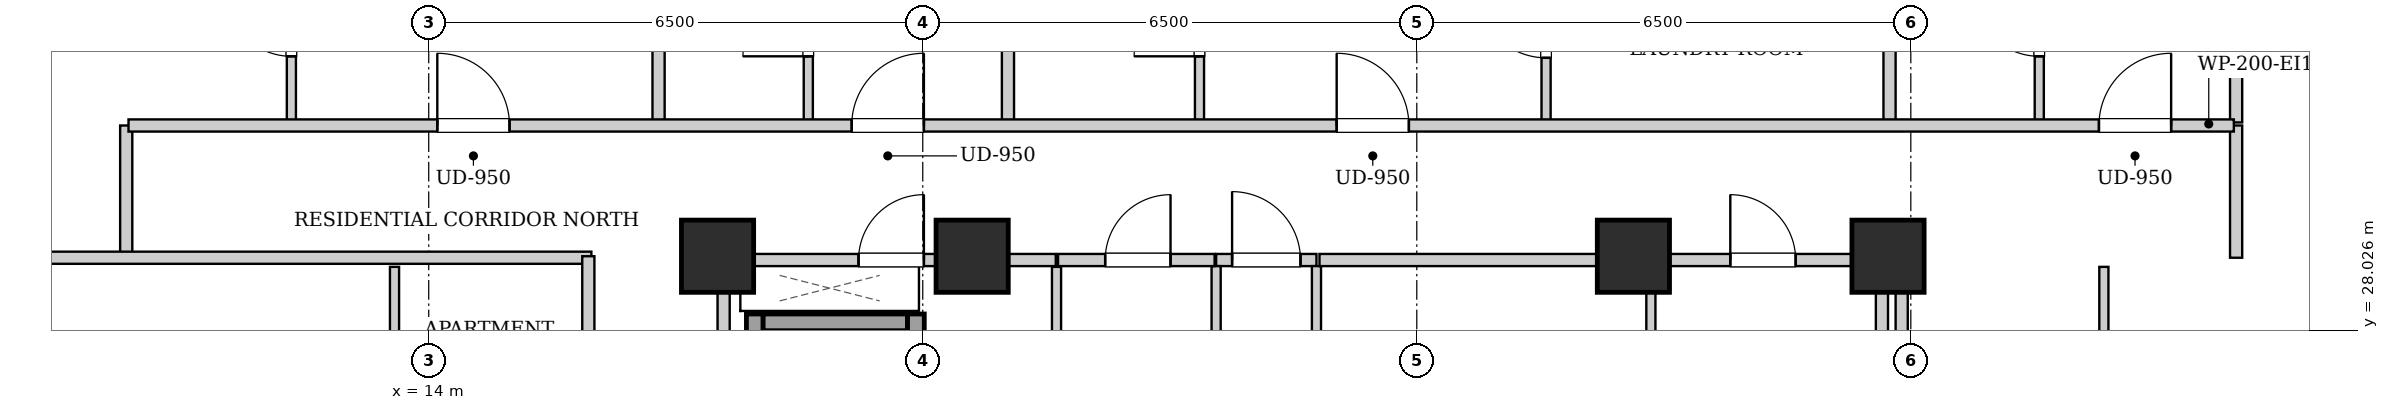
"""IFC4 building model, lengths in metres.
Left out: names, types, materials, properties, quantities, classifications, styles, units other than length and angle.
Written with IfcOpenShell. Run it as: python <this file> out.ifc"""

import sys

from ifc_helpers import new_model, si_unit, direction, frame, frame_2d, origin, origin_2d, place, context, subcontext, project, spatial, rectangle, extrude, element, fill, save


model = new_model("IFC4")
c1 = context("Model", 3, precision=1e-05, world=origin(), true_north=direction((0.0, 1.0)))
c2 = subcontext(c1, "Body", "Model", "MODEL_VIEW")
j1 = project(units=[si_unit("LENGTHUNIT", "METRE"), si_unit("PLANEANGLEUNIT", "RADIAN")], contexts=[c1])
p1 = place(None, origin())
s1 = spatial("IfcSite", under=j1, at=p1, CompositionType="ELEMENT")
p2 = place(p1, origin())
s2 = spatial("IfcBuilding", under=s1, at=p2, CompositionType="ELEMENT")
p3 = place(p2, frame((0.0, 0.0, 143.9)))
s3 = spatial("IfcBuildingStorey", under=s2, at=p3, CompositionType="ELEMENT", Elevation=143.9)
for number, where, z_axis, x_axis in (
    (1, (17.8, 29.0, 0.0), (0.0, 0.0, 1.0), (1.0, 0.0, 0.0)),
    (2, (21.15, 29.0, 0.0), (0.0, 0.0, 1.0), (1.0, 0.0, 0.0)),
    (3, (29.85, 29.0, 0.0), (0.0, 0.0, 1.0), (1.0, 0.0, 0.0)),
    (4, (33.2, 29.0, 0.0), (0.0, 0.0, 1.0), (1.0, 0.0, 0.0)),
):
    element("IfcColumn", number, at=place(p3, frame(where, z_axis=z_axis, x_axis=x_axis)), inside=s3, PredefinedType="COLUMN", context=c2, shape_type="SweptSolid", body=[
        extrude(rectangle(XDim=0.95, YDim=0.95, at=origin_2d()), origin(), (0.0, 0.0, 1.0), 3.25),
    ])
p4 = place(p3, frame((18.29, 24.1, 0.0), z_axis=(0.0, 0.0, 1.0), x_axis=(0.0, 1.0, 0.0)))
e5 = element("IfcWall", 5, at=p4, inside=s3, PredefinedType="SHEAR", context=c2, shape_type="SweptSolid", body=[
    extrude(rectangle(XDim=4.14, YDim=0.22, at=frame_2d((2.07, 0.0))), origin(), (0.0, 0.0, 1.0), 2.99),
])
p5 = place(p3, frame((18.4, 28.13, 0.0), z_axis=(0.0, 0.0, 1.0), x_axis=(1.0, 0.0, 0.0)))
e6 = element("IfcWall", 6, at=p5, inside=s3, PredefinedType="SHEAR", context=c2, shape_type="SweptSolid", body=[
    extrude(rectangle(XDim=1.9, YDim=0.22, at=frame_2d((0.95, 0.0))), origin(), (0.0, 0.0, 1.0), 2.99),
])
p6 = place(p3, frame((20.41, 26.06, 0.0), z_axis=(0.0, 0.0, 1.0), x_axis=(0.0, 1.0, 0.0)))
e7 = element("IfcWall", 7, at=p6, inside=s3, PredefinedType="SHEAR", context=c2, shape_type="SweptSolid", body=[
    extrude(rectangle(XDim=2.18, YDim=0.22, at=frame_2d((1.09, 0.0))), origin(), (0.0, 0.0, 1.0), 2.99),
])
for number, where, z_axis, x_axis in (
    (8, (17.88, 24.12, 0.0), (0.0, 0.0, 1.0), (0.0, 1.0, 0.0)),
    (9, (33.12, 24.12, 0.0), (0.0, 0.0, 1.0), (0.0, 1.0, 0.0)),
):
    element("IfcWall", number, at=place(p3, frame(where, z_axis=z_axis, x_axis=x_axis)), inside=s3, PredefinedType="PARTITIONING", context=c2, shape_type="SweptSolid", body=[
        extrude(rectangle(XDim=4.76, YDim=0.16, at=frame_2d((2.38, 0.0))), origin(), (0.0, 0.0, 1.0), 2.99),
    ])
p7 = place(p3, frame((24.36, 28.95, 0.0), z_axis=(0.0, 0.0, 1.0), x_axis=(1.0, 0.0, 0.0)))
e10 = element("IfcWall", 10, at=p7, inside=s3, PredefinedType="PARTITIONING", context=c2, shape_type="SweptSolid", body=[
    extrude(rectangle(XDim=1.32, YDim=0.16, at=frame_2d((0.66, 0.0))), origin(), (0.0, 0.0, 1.0), 2.426),
])
p8 = place(p7, frame((0.21, 0.0, 0.0)))
e11 = element("IfcOpeningElement", 11, at=p8, cuts=e10, PredefinedType="OPENING", context=c2, shape_type="SweptSolid", body=[
    extrude(rectangle(XDim=0.9, YDim=2.05, at=frame_2d((0.45, 1.025))), frame((0.0, 0.09, 0.0), z_axis=(0.0, -1.0, 0.0), x_axis=(1.0, 0.0, 0.0)), (0.0, 0.0, 1.0), 0.18),
])
p9 = place(p3, frame((17.96, 28.95, 0.0), z_axis=(0.0, 0.0, 1.0), x_axis=(1.0, 0.0, 0.0)))
e12 = element("IfcWall", 12, at=p9, inside=s3, PredefinedType="PARTITIONING", context=c2, shape_type="SweptSolid", body=[
    extrude(rectangle(XDim=4.29, YDim=0.16, at=frame_2d((2.145, 0.0))), origin(), (0.0, 0.0, 1.0), 2.426),
])
p10 = place(p9, frame((1.695, 0.0, 0.0)))
e13 = element("IfcOpeningElement", 13, at=p10, cuts=e12, PredefinedType="OPENING", context=c2, shape_type="SweptSolid", body=[
    extrude(rectangle(XDim=0.86, YDim=2.05, at=frame_2d((0.43, 1.025))), frame((0.0, 0.09, 0.0), z_axis=(0.0, -1.0, 0.0), x_axis=(1.0, 0.0, 0.0)), (0.0, 0.0, 1.0), 0.18),
])
for number, where, z_axis, x_axis in (
    (14, (24.36, 25.0, 0.0), (0.0, 0.0, 1.0), (0.0, 1.0, 0.0)),
    (15, (25.68, 25.0, 0.0), (0.0, 0.0, 1.0), (0.0, 1.0, 0.0)),
):
    element("IfcWall", number, at=place(p3, frame(where, z_axis=z_axis, x_axis=x_axis)), inside=s3, PredefinedType="PARTITIONING", context=c2, shape_type="SweptSolid", body=[
        extrude(rectangle(XDim=3.87, YDim=0.12, at=frame_2d((1.935, 0.0))), origin(), (0.0, 0.0, 1.0), 2.99),
    ])
p11 = place(p3, frame((30.08, 26.18, 0.0), z_axis=(0.0, 0.0, 1.0), x_axis=(0.0, 1.0, 0.0)))
e16 = element("IfcWall", 16, at=p11, inside=s3, PredefinedType="PARTITIONING", context=c2, shape_type="SweptSolid", body=[
    extrude(rectangle(XDim=2.68, YDim=0.12, at=frame_2d((1.34, 0.0))), origin(), (0.0, 0.0, 1.0), 2.99),
])
p12 = place(p3, frame((30.08, 28.95, 0.0), z_axis=(0.0, 0.0, 1.0), x_axis=(1.0, 0.0, 0.0)))
e17 = element("IfcWall", 17, at=p12, inside=s3, PredefinedType="PARTITIONING", context=c2, shape_type="SweptSolid", body=[
    extrude(rectangle(XDim=2.96, YDim=0.16, at=frame_2d((1.48, 0.0))), origin(), (0.0, 0.0, 1.0), 2.99),
])
p13 = place(p12, frame((1.045, 0.0, 0.0)))
e18 = element("IfcOpeningElement", 18, at=p13, cuts=e17, PredefinedType="OPENING", context=c2, shape_type="SweptSolid", body=[
    extrude(rectangle(XDim=0.86, YDim=2.05, at=frame_2d((0.43, 1.025))), frame((0.0, 0.09, 0.0), z_axis=(0.0, -1.0, 0.0), x_axis=(1.0, 0.0, 0.0)), (0.0, 0.0, 1.0), 0.18),
])
p14 = place(p3, frame((22.26, 25.0, 0.0), z_axis=(0.0, 0.0, 1.0), x_axis=(0.0, 1.0, 0.0)))
e19 = element("IfcWall", 19, at=p14, inside=s3, PredefinedType="PARTITIONING", context=c2, shape_type="SweptSolid", body=[
    extrude(rectangle(XDim=3.86, YDim=0.12, at=frame_2d((1.93, 0.0))), origin(), (0.0, 0.0, 1.0), 2.99),
])
p15 = place(p3, frame((22.28, 28.95, 0.0), z_axis=(0.0, 0.0, 1.0), x_axis=(1.0, 0.0, 0.0)))
e20 = element("IfcWall", 20, at=p15, inside=s3, PredefinedType="PARTITIONING", context=c2, shape_type="SweptSolid", body=[
    extrude(rectangle(XDim=2.06, YDim=0.16, at=frame_2d((1.03, 0.0))), origin(), (0.0, 0.0, 1.0), 2.426),
])
p16 = place(p15, frame((0.62, 0.0, 0.0)))
e21 = element("IfcOpeningElement", 21, at=p16, cuts=e20, PredefinedType="OPENING", context=c2, shape_type="SweptSolid", body=[
    extrude(rectangle(XDim=0.86, YDim=2.05, at=frame_2d((0.43, 1.025))), frame((0.0, 0.09, 0.0), z_axis=(0.0, -1.0, 0.0), x_axis=(1.0, 0.0, 0.0)), (0.0, 0.0, 1.0), 0.18),
])
p17 = place(p3, frame((25.72, 28.95, 0.0), z_axis=(0.0, 0.0, 1.0), x_axis=(1.0, 0.0, 0.0)))
e22 = element("IfcWall", 22, at=p17, inside=s3, PredefinedType="PARTITIONING", context=c2, shape_type="SweptSolid", body=[
    extrude(rectangle(XDim=4.32, YDim=0.16, at=frame_2d((2.16, 0.0))), origin(), (0.0, 0.0, 1.0), 2.426),
])
for number, where, z_axis, x_axis in (
    (23, (10.02, 28.98, 0.0), (0.0, 0.0, 1.0), (0.0, 1.0, 0.0)),
    (24, (37.78, 28.98, 0.0), (0.0, 0.0, 1.0), (0.0, 1.0, 0.0)),
):
    element("IfcWall", number, at=place(p3, frame(where, z_axis=z_axis, x_axis=x_axis)), inside=s3, PredefinedType="PARTITIONING", context=c2, shape_type="SweptSolid", body=[
        extrude(rectangle(XDim=1.74, YDim=0.16, at=frame_2d((0.87, 0.0))), origin(), (0.0, 0.0, 1.0), 2.99),
    ])
p18 = place(p3, frame((7.78, 28.98, 0.0), z_axis=(0.0, 0.0, 1.0), x_axis=(1.0, 0.0, 0.0)))
e25 = element("IfcWall", 25, at=p18, inside=s3, PredefinedType="PARTITIONING", context=c2, shape_type="SweptSolid", body=[
    extrude(rectangle(XDim=8.36, YDim=0.16, at=frame_2d((4.18, 0.0))), origin(), (0.0, 0.0, 1.0), 2.426),
])
p19 = place(p3, frame((12.193, 30.76, 0.0), z_axis=(0.0, 0.0, 1.0), x_axis=(0.0, 1.0, 0.0)))
e26 = element("IfcWall", 26, at=p19, inside=s3, PredefinedType="PARTITIONING", context=c2, shape_type="SweptSolid", body=[
    extrude(rectangle(XDim=2.6, YDim=0.12, at=frame_2d((1.3, 0.0))), origin(), (0.0, 0.0, 1.0), 2.99),
])
p20 = place(p19, frame((0.87, 0.0, 0.0)))
e27 = element("IfcOpeningElement", 27, at=p20, cuts=e26, PredefinedType="OPENING", context=c2, shape_type="SweptSolid", body=[
    extrude(rectangle(XDim=0.86, YDim=2.05, at=frame_2d((0.43, 1.025))), frame((0.0, 0.07, 0.0), z_axis=(0.0, -1.0, 0.0), x_axis=(1.0, 0.0, 0.0)), (0.0, 0.0, 1.0), 0.14),
])
p21 = place(p3, frame((17.024, 30.76, 0.0), z_axis=(0.0, 0.0, 1.0), x_axis=(0.0, 1.0, 0.0)))
e28 = element("IfcWall", 28, at=p21, inside=s3, PredefinedType="PARTITIONING", context=c2, shape_type="SweptSolid", body=[
    extrude(rectangle(XDim=12.26, YDim=0.16, at=frame_2d((6.13, 0.0))), origin(), (0.0, 0.0, 1.0), 2.99),
])
p22 = place(p3, frame((18.994, 30.76, 0.0), z_axis=(0.0, 0.0, 1.0), x_axis=(0.0, 1.0, 0.0)))
e29 = element("IfcWall", 29, at=p22, inside=s3, PredefinedType="PARTITIONING", context=c2, shape_type="SweptSolid", body=[
    extrude(rectangle(XDim=2.6, YDim=0.12, at=frame_2d((1.3, 0.0))), origin(), (0.0, 0.0, 1.0), 2.99),
])
p23 = place(p22, frame((0.87, 0.0, 0.0)))
e30 = element("IfcOpeningElement", 30, at=p23, cuts=e29, PredefinedType="OPENING", context=c2, shape_type="SweptSolid", body=[
    extrude(rectangle(XDim=0.86, YDim=2.05, at=frame_2d((0.43, 1.025))), frame((0.0, 0.07, 0.0), z_axis=(0.0, -1.0, 0.0), x_axis=(1.0, 0.0, 0.0)), (0.0, 0.0, 1.0), 0.14),
])
p24 = place(p3, frame((21.621, 30.76, 0.0), z_axis=(0.0, 0.0, 1.0), x_axis=(0.0, 1.0, 0.0)))
e31 = element("IfcWall", 31, at=p24, inside=s3, PredefinedType="PARTITIONING", context=c2, shape_type="SweptSolid", body=[
    extrude(rectangle(XDim=12.26, YDim=0.16, at=frame_2d((6.13, 0.0))), origin(), (0.0, 0.0, 1.0), 2.99),
])
p25 = place(p3, frame((24.141, 30.76, 0.0), z_axis=(0.0, 0.0, 1.0), x_axis=(0.0, 1.0, 0.0)))
e32 = element("IfcWall", 32, at=p25, inside=s3, PredefinedType="PARTITIONING", context=c2, shape_type="SweptSolid", body=[
    extrude(rectangle(XDim=2.6, YDim=0.12, at=frame_2d((1.3, 0.0))), origin(), (0.0, 0.0, 1.0), 2.99),
])
p26 = place(p25, frame((0.87, 0.0, 0.0)))
e33 = element("IfcOpeningElement", 33, at=p26, cuts=e32, PredefinedType="OPENING", context=c2, shape_type="SweptSolid", body=[
    extrude(rectangle(XDim=0.86, YDim=2.05, at=frame_2d((0.43, 1.025))), frame((0.0, 0.07, 0.0), z_axis=(0.0, -1.0, 0.0), x_axis=(1.0, 0.0, 0.0)), (0.0, 0.0, 1.0), 0.14),
])
p27 = place(p3, frame((28.701, 30.76, 0.0), z_axis=(0.0, 0.0, 1.0), x_axis=(0.0, 1.0, 0.0)))
e34 = element("IfcWall", 34, at=p27, inside=s3, PredefinedType="PARTITIONING", context=c2, shape_type="SweptSolid", body=[
    extrude(rectangle(XDim=2.6, YDim=0.12, at=frame_2d((1.3, 0.0))), origin(), (0.0, 0.0, 1.0), 2.99),
])
p28 = place(p27, frame((0.85, 0.0, 0.0)))
e35 = element("IfcOpeningElement", 35, at=p28, cuts=e34, PredefinedType="OPENING", context=c2, shape_type="SweptSolid", body=[
    extrude(rectangle(XDim=0.9, YDim=2.05, at=frame_2d((0.45, 1.025))), frame((0.0, 0.07, 0.0), z_axis=(0.0, -1.0, 0.0), x_axis=(1.0, 0.0, 0.0)), (0.0, 0.0, 1.0), 0.14),
])
p29 = place(p3, frame((37.78, 30.76, 0.0), z_axis=(0.0, 0.0, 1.0), x_axis=(0.0, 1.0, 0.0)))
e36 = element("IfcWall", 36, at=p29, inside=s3, PredefinedType="PARTITIONING", context=c2, shape_type="SweptSolid", body=[
    extrude(rectangle(XDim=2.66, YDim=0.16, at=frame_2d((1.33, 0.0))), origin(), (0.0, 0.0, 1.0), 2.99),
])
p30 = place(p3, frame((33.22, 30.76, 0.0), z_axis=(0.0, 0.0, 1.0), x_axis=(0.0, 1.0, 0.0)))
e37 = element("IfcWall", 37, at=p30, inside=s3, PredefinedType="PARTITIONING", context=c2, shape_type="SweptSolid", body=[
    extrude(rectangle(XDim=10.28, YDim=0.16, at=frame_2d((5.14, 0.0))), origin(), (0.0, 0.0, 1.0), 2.426),
])
p31 = place(p3, frame((35.19, 30.76, 0.0), z_axis=(0.0, 0.0, 1.0), x_axis=(0.0, 1.0, 0.0)))
e38 = element("IfcWall", 38, at=p31, inside=s3, PredefinedType="PARTITIONING", context=c2, shape_type="SweptSolid", body=[
    extrude(rectangle(XDim=2.6, YDim=0.12, at=frame_2d((1.3, 0.0))), origin(), (0.0, 0.0, 1.0), 2.99),
])
p32 = place(p31, frame((0.87, 0.0, 0.0)))
e39 = element("IfcOpeningElement", 39, at=p32, cuts=e38, PredefinedType="OPENING", context=c2, shape_type="SweptSolid", body=[
    extrude(rectangle(XDim=0.86, YDim=2.05, at=frame_2d((0.43, 1.025))), frame((0.0, 0.07, 0.0), z_axis=(0.0, -1.0, 0.0), x_axis=(1.0, 0.0, 0.0)), (0.0, 0.0, 1.0), 0.14),
])
p33 = place(p3, frame((13.55, 23.527, 0.0), z_axis=(0.0, 0.0, 1.0), x_axis=(0.0, 1.0, 0.0)))
e40 = element("IfcWall", 40, at=p33, inside=s3, PredefinedType="PARTITIONING", context=c2, shape_type="SweptSolid", body=[
    extrude(rectangle(XDim=5.333, YDim=0.12, at=frame_2d((2.667, 0.0))), origin(), (0.0, 0.0, 1.0), 2.99),
])
p34 = place(p33, frame((2.216, 0.0, 0.0)))
e41 = element("IfcOpeningElement", 41, at=p34, cuts=e40, PredefinedType="OPENING", context=c2, shape_type="SweptSolid", body=[
    extrude(rectangle(XDim=0.9, YDim=2.05, at=frame_2d((0.45, 1.025))), frame((0.0, 0.07, 0.0), z_axis=(0.0, -1.0, 0.0), x_axis=(1.0, 0.0, 0.0)), (0.0, 0.0, 1.0), 0.14),
])
p35 = place(p3, frame((36.04, 24.552, 0.0), z_axis=(0.0, 0.0, 1.0), x_axis=(0.0, 1.0, 0.0)))
e42 = element("IfcWall", 42, at=p35, inside=s3, PredefinedType="PARTITIONING", context=c2, shape_type="SweptSolid", body=[
    extrude(rectangle(XDim=4.308, YDim=0.12, at=frame_2d((2.154, 0.0))), origin(), (0.0, 0.0, 1.0), 2.99),
])
p36 = place(p35, frame((1.704, 0.0, 0.0)))
e43 = element("IfcOpeningElement", 43, at=p36, cuts=e42, PredefinedType="OPENING", context=c2, shape_type="SweptSolid", body=[
    extrude(rectangle(XDim=0.9, YDim=2.05, at=frame_2d((0.45, 1.025))), frame((0.0, 0.07, 0.0), z_axis=(0.0, -1.0, 0.0), x_axis=(1.0, 0.0, 0.0)), (0.0, 0.0, 1.0), 0.14),
])
p37 = place(p3, frame((10.05, 30.72, 0.0), z_axis=(0.0, 0.0, 1.0), x_axis=(1.0, 0.0, 0.0)))
e44 = element("IfcWall", 44, at=p37, inside=s3, PredefinedType="PARTITIONING", context=c2, shape_type="SweptSolid", body=[
    extrude(rectangle(XDim=27.7, YDim=0.16, at=frame_2d((13.85, 0.0))), origin(), (0.0, 0.0, 1.0), 2.99),
])
p38 = place(p37, frame((4.063, 0.0, 0.0)))
e45 = element("IfcOpeningElement", 45, at=p38, cuts=e44, PredefinedType="OPENING", context=c2, shape_type="SweptSolid", body=[
    extrude(rectangle(XDim=0.95, YDim=2.1, at=frame_2d((0.475, 1.05))), frame((0.0, 0.09, 0.0), z_axis=(0.0, -1.0, 0.0), x_axis=(1.0, 0.0, 0.0)), (0.0, 0.0, 1.0), 0.18),
])
p39 = place(p37, frame((9.515, 0.0, 0.0)))
e46 = element("IfcOpeningElement", 46, at=p39, cuts=e44, PredefinedType="OPENING", context=c2, shape_type="SweptSolid", body=[
    extrude(rectangle(XDim=0.95, YDim=2.1, at=frame_2d((0.475, 1.05))), frame((0.0, 0.09, 0.0), z_axis=(0.0, -1.0, 0.0), x_axis=(1.0, 0.0, 0.0)), (0.0, 0.0, 1.0), 0.18),
])
p40 = place(p37, frame((15.896, 0.0, 0.0)))
e47 = element("IfcOpeningElement", 47, at=p40, cuts=e44, PredefinedType="OPENING", context=c2, shape_type="SweptSolid", body=[
    extrude(rectangle(XDim=0.95, YDim=2.1, at=frame_2d((0.475, 1.05))), frame((0.0, 0.09, 0.0), z_axis=(0.0, -1.0, 0.0), x_axis=(1.0, 0.0, 0.0)), (0.0, 0.0, 1.0), 0.18),
])
p41 = place(p37, frame((25.925, 0.0, 0.0)))
e48 = element("IfcOpeningElement", 48, at=p41, cuts=e44, PredefinedType="OPENING", context=c2, shape_type="SweptSolid", body=[
    extrude(rectangle(XDim=0.95, YDim=2.1, at=frame_2d((0.475, 1.05))), frame((0.0, 0.09, 0.0), z_axis=(0.0, -1.0, 0.0), x_axis=(1.0, 0.0, 0.0)), (0.0, 0.0, 1.0), 0.18),
])
p42 = place(p3, frame((16.1, 15.07, 0.0), z_axis=(0.0, 0.0, 1.0), x_axis=(0.0, 1.0, 0.0)))
e49 = element("IfcWall", 49, at=p42, inside=s3, PredefinedType="PARTITIONING", context=c2, shape_type="SweptSolid", body=[
    extrude(rectangle(XDim=13.93, YDim=0.16, at=frame_2d((6.965, 0.0))), origin(), (0.0, 0.0, 1.0), 2.99),
])
p43 = place(p42, frame((3.608, 0.0, 0.0)))
e50 = element("IfcOpeningElement", 50, at=p43, cuts=e49, PredefinedType="OPENING", context=c2, shape_type="SweptSolid", body=[
    extrude(rectangle(XDim=0.95, YDim=2.1, at=frame_2d((0.475, 1.05))), frame((0.0, 0.09, 0.0), z_axis=(0.0, -1.0, 0.0), x_axis=(1.0, 0.0, 0.0)), (0.0, 0.0, 1.0), 0.18),
])
p44 = place(p42, frame((10.649, 0.0, 0.0)))
e51 = element("IfcOpeningElement", 51, at=p44, cuts=e49, PredefinedType="OPENING", context=c2, shape_type="SweptSolid", body=[
    extrude(rectangle(XDim=0.95, YDim=2.1, at=frame_2d((0.475, 1.05))), frame((0.0, 0.09, 0.0), z_axis=(0.0, -1.0, 0.0), x_axis=(1.0, 0.0, 0.0)), (0.0, 0.0, 1.0), 0.18),
])
p45 = place(p3, frame((33.38, 15.02, 0.0), z_axis=(0.0, 0.0, 1.0), x_axis=(0.0, 1.0, 0.0)))
e52 = element("IfcWall", 52, at=p45, inside=s3, PredefinedType="PARTITIONING", context=c2, shape_type="SweptSolid", body=[
    extrude(rectangle(XDim=13.98, YDim=0.16, at=frame_2d((6.99, 0.0))), origin(), (0.0, 0.0, 1.0), 2.99),
])
p46 = place(p8, origin())
e53 = element("IfcDoor", 53, at=p46, inside=s3, OperationType="SINGLE_SWING_LEFT", PredefinedType="DOOR", context=c2, shape_type="SweptSolid", body=[
    extrude(rectangle(XDim=0.9, YDim=2.05, at=frame_2d((0.45, 1.025))), frame((0.0, 0.025, 0.0), z_axis=(0.0, -1.0, 0.0), x_axis=(1.0, 0.0, 0.0)), (0.0, 0.0, 1.0), 0.05),
])
fill(e11, e53)
p47 = place(p10, origin())
e54 = element("IfcDoor", 54, at=p47, inside=s3, OperationType="SINGLE_SWING_RIGHT", PredefinedType="DOOR", context=c2, shape_type="SweptSolid", body=[
    extrude(rectangle(XDim=0.86, YDim=2.05, at=frame_2d((0.43, 1.025))), frame((0.0, 0.025, 0.0), z_axis=(0.0, -1.0, 0.0), x_axis=(1.0, 0.0, 0.0)), (0.0, 0.0, 1.0), 0.05),
])
fill(e13, e54)
p48 = place(p13, origin())
e55 = element("IfcDoor", 55, at=p48, inside=s3, OperationType="SINGLE_SWING_LEFT", PredefinedType="DOOR", context=c2, shape_type="SweptSolid", body=[
    extrude(rectangle(XDim=0.86, YDim=2.05, at=frame_2d((0.43, 1.025))), frame((0.0, 0.025, 0.0), z_axis=(0.0, -1.0, 0.0), x_axis=(1.0, 0.0, 0.0)), (0.0, 0.0, 1.0), 0.05),
])
fill(e18, e55)
p49 = place(p16, origin())
e56 = element("IfcDoor", 56, at=p49, inside=s3, OperationType="SINGLE_SWING_RIGHT", PredefinedType="DOOR", context=c2, shape_type="SweptSolid", body=[
    extrude(rectangle(XDim=0.86, YDim=2.05, at=frame_2d((0.43, 1.025))), frame((0.0, 0.025, 0.0), z_axis=(0.0, -1.0, 0.0), x_axis=(1.0, 0.0, 0.0)), (0.0, 0.0, 1.0), 0.05),
])
fill(e21, e56)
p50 = place(p20, origin())
e57 = element("IfcDoor", 57, at=p50, inside=s3, OperationType="SINGLE_SWING_RIGHT", PredefinedType="DOOR", context=c2, shape_type="SweptSolid", body=[
    extrude(rectangle(XDim=0.86, YDim=2.05, at=frame_2d((0.43, 1.025))), frame((0.0, 0.025, 0.0), z_axis=(0.0, -1.0, 0.0), x_axis=(1.0, 0.0, 0.0)), (0.0, 0.0, 1.0), 0.05),
])
fill(e27, e57)
p51 = place(p23, origin())
e58 = element("IfcDoor", 58, at=p51, inside=s3, OperationType="SINGLE_SWING_LEFT", PredefinedType="DOOR", context=c2, shape_type="SweptSolid", body=[
    extrude(rectangle(XDim=0.86, YDim=2.05, at=frame_2d((0.43, 1.025))), frame((0.0, 0.025, 0.0), z_axis=(0.0, -1.0, 0.0), x_axis=(1.0, 0.0, 0.0)), (0.0, 0.0, 1.0), 0.05),
])
fill(e30, e58)
p52 = place(p26, origin())
e59 = element("IfcDoor", 59, at=p52, inside=s3, OperationType="SINGLE_SWING_LEFT", PredefinedType="DOOR", context=c2, shape_type="SweptSolid", body=[
    extrude(rectangle(XDim=0.86, YDim=2.05, at=frame_2d((0.43, 1.025))), frame((0.0, 0.025, 0.0), z_axis=(0.0, -1.0, 0.0), x_axis=(1.0, 0.0, 0.0)), (0.0, 0.0, 1.0), 0.05),
])
fill(e33, e59)
p53 = place(p28, origin())
e60 = element("IfcDoor", 60, at=p53, inside=s3, OperationType="SINGLE_SWING_RIGHT", PredefinedType="DOOR", context=c2, shape_type="SweptSolid", body=[
    extrude(rectangle(XDim=0.9, YDim=2.05, at=frame_2d((0.45, 1.025))), frame((0.0, 0.025, 0.0), z_axis=(0.0, -1.0, 0.0), x_axis=(1.0, 0.0, 0.0)), (0.0, 0.0, 1.0), 0.05),
])
fill(e35, e60)
p54 = place(p32, origin())
e61 = element("IfcDoor", 61, at=p54, inside=s3, OperationType="SINGLE_SWING_RIGHT", PredefinedType="DOOR", context=c2, shape_type="SweptSolid", body=[
    extrude(rectangle(XDim=0.86, YDim=2.05, at=frame_2d((0.43, 1.025))), frame((0.0, 0.025, 0.0), z_axis=(0.0, -1.0, 0.0), x_axis=(1.0, 0.0, 0.0)), (0.0, 0.0, 1.0), 0.05),
])
fill(e39, e61)
p55 = place(p38, origin())
e62 = element("IfcDoor", 62, at=p55, inside=s3, OperationType="SINGLE_SWING_LEFT", PredefinedType="DOOR", context=c2, shape_type="SweptSolid", body=[
    extrude(rectangle(XDim=0.95, YDim=2.1, at=frame_2d((0.475, 1.05))), frame((0.0, 0.025, 0.0), z_axis=(0.0, -1.0, 0.0), x_axis=(1.0, 0.0, 0.0)), (0.0, 0.0, 1.0), 0.05),
])
fill(e45, e62)
p56 = place(p39, origin())
e63 = element("IfcDoor", 63, at=p56, inside=s3, OperationType="SINGLE_SWING_RIGHT", PredefinedType="DOOR", context=c2, shape_type="SweptSolid", body=[
    extrude(rectangle(XDim=0.95, YDim=2.1, at=frame_2d((0.475, 1.05))), frame((0.0, 0.025, 0.0), z_axis=(0.0, -1.0, 0.0), x_axis=(1.0, 0.0, 0.0)), (0.0, 0.0, 1.0), 0.05),
])
fill(e46, e63)
p57 = place(p40, origin())
e64 = element("IfcDoor", 64, at=p57, inside=s3, OperationType="SINGLE_SWING_LEFT", PredefinedType="DOOR", context=c2, shape_type="SweptSolid", body=[
    extrude(rectangle(XDim=0.95, YDim=2.1, at=frame_2d((0.475, 1.05))), frame((0.0, 0.025, 0.0), z_axis=(0.0, -1.0, 0.0), x_axis=(1.0, 0.0, 0.0)), (0.0, 0.0, 1.0), 0.05),
])
fill(e47, e64)
p58 = place(p41, origin())
e65 = element("IfcDoor", 65, at=p58, inside=s3, OperationType="SINGLE_SWING_RIGHT", PredefinedType="DOOR", context=c2, shape_type="SweptSolid", body=[
    extrude(rectangle(XDim=0.95, YDim=2.1, at=frame_2d((0.475, 1.05))), frame((0.0, 0.025, 0.0), z_axis=(0.0, -1.0, 0.0), x_axis=(1.0, 0.0, 0.0)), (0.0, 0.0, 1.0), 0.05),
])
fill(e48, e65)
save(model, sys.argv[1])
